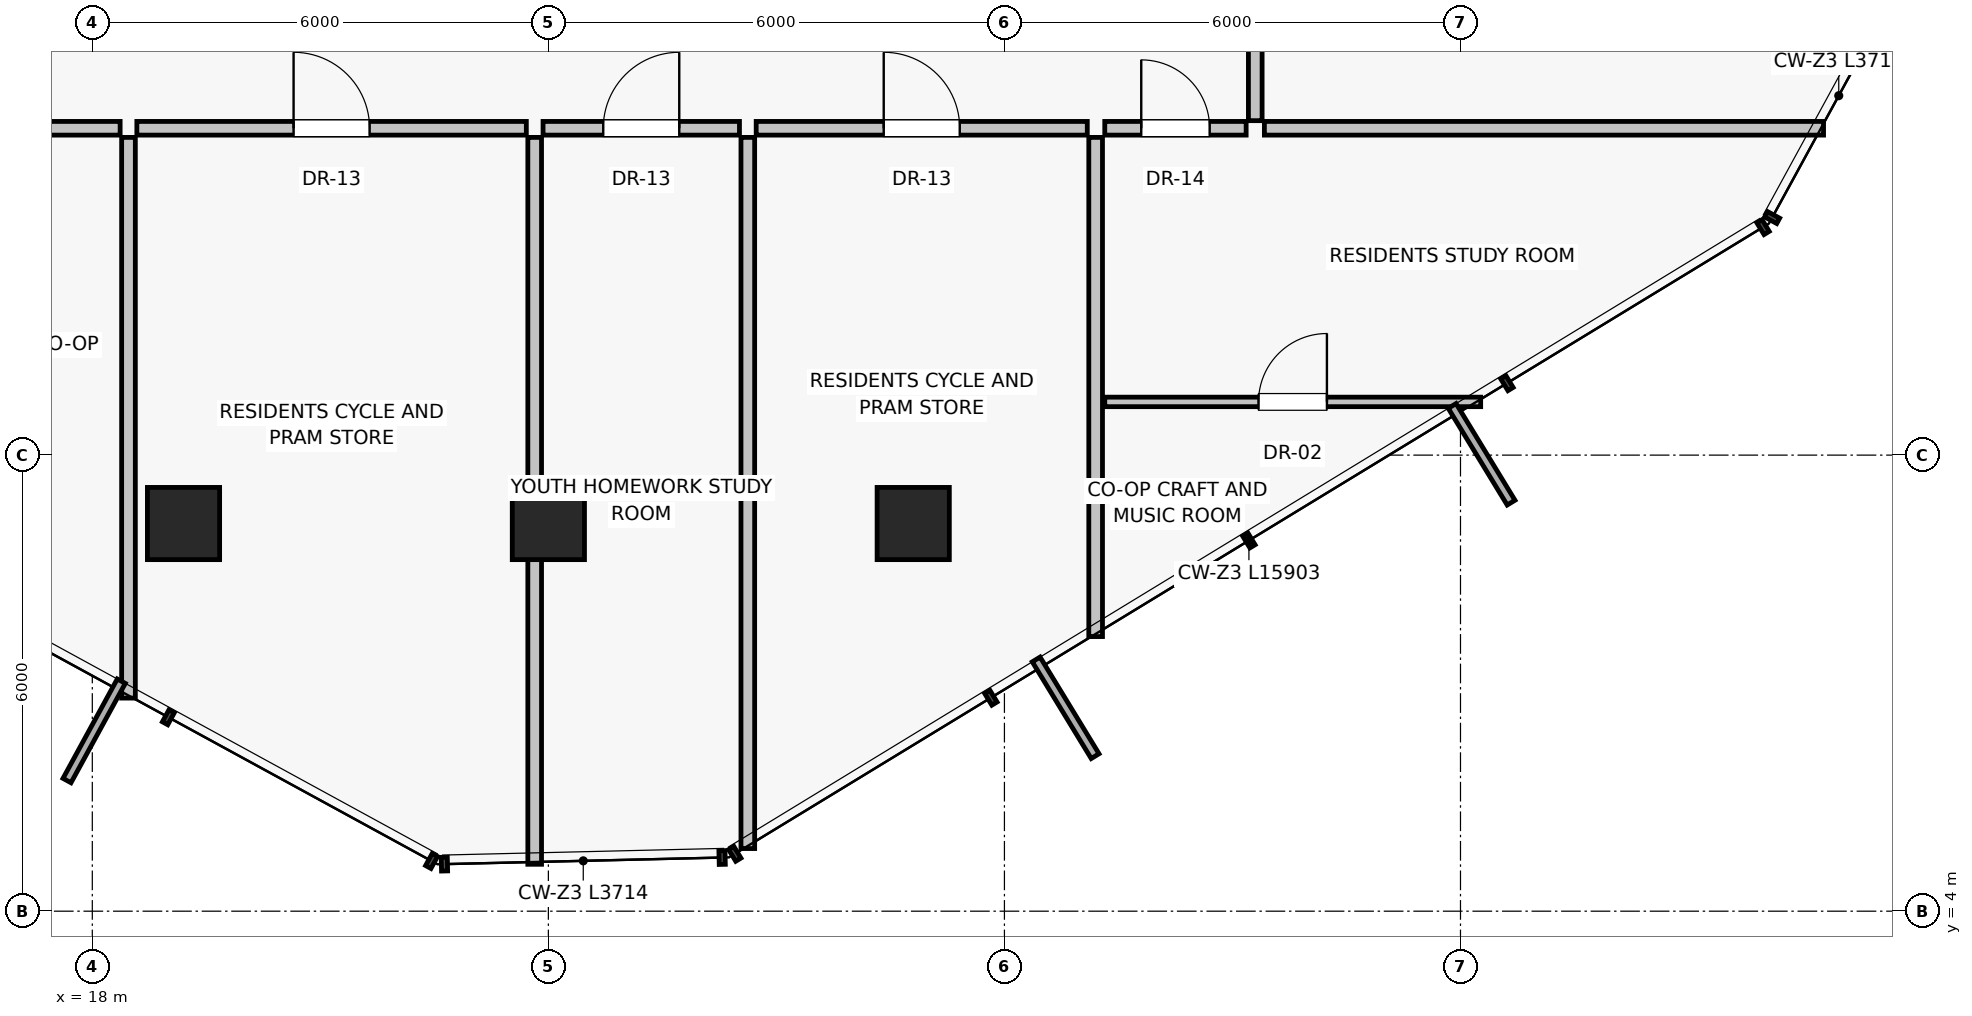
"""IFC4 building model, lengths in metres.
Left out: names, types, materials, properties, quantities, classifications, styles, units other than length and angle.
Written with IfcOpenShell. Run it as: python <this file> out.ifc"""

import sys

from ifc_helpers import new_model, si_unit, direction, frame, frame_2d, origin, origin_2d, place, context, subcontext, project, spatial, rectangle, extrude, source, transform, mapped, element, fill, save


model = new_model("IFC4")
c1 = context("Model", 3, precision=1e-05, world=origin(), true_north=direction((0.0, 1.0)))
c2 = subcontext(c1, "Body", "Model", "MODEL_VIEW")
j1 = project(units=[si_unit("LENGTHUNIT", "METRE"), si_unit("PLANEANGLEUNIT", "RADIAN")], contexts=[c1])
p1 = place(None, origin())
s1 = spatial("IfcSite", under=j1, at=p1, CompositionType="ELEMENT")
p2 = place(p1, origin())
s2 = spatial("IfcBuilding", under=s1, at=p2, CompositionType="ELEMENT")
p3 = place(p2, frame((0.0, 0.0, 201.6)))
s3 = spatial("IfcBuildingStorey", under=s2, at=p3, CompositionType="ELEMENT", Elevation=201.6)
for number, where, z_axis, x_axis in (
    (1, (19.2, 9.1, 0.0), (0.0, 0.0, 1.0), (1.0, 0.0, 0.0)),
    (2, (24.0, 9.1, 0.0), (0.0, 0.0, 1.0), (1.0, 0.0, 0.0)),
    (3, (28.8, 9.1, 0.0), (0.0, 0.0, 1.0), (1.0, 0.0, 0.0)),
):
    element("IfcColumn", number, at=place(p3, frame(where, z_axis=z_axis, x_axis=x_axis)), inside=s3, PredefinedType="COLUMN", context=c2, shape_type="SweptSolid", body=[
        extrude(rectangle(XDim=0.95, YDim=0.95, at=origin_2d()), origin(), (0.0, 0.0, 1.0), 3.25),
    ])
p4 = place(p3, frame((31.2, 14.18, 0.0), z_axis=(0.0, 0.0, 1.0), x_axis=(0.0, -1.0, 0.0)))
e4 = element("IfcWall", 4, at=p4, inside=s3, PredefinedType="PARTITIONING", context=c2, shape_type="SweptSolid", body=[
    extrude(rectangle(XDim=6.567, YDim=0.18, at=frame_2d((3.284, 0.0))), origin(), (0.0, 0.0, 1.0), 3.015),
])
p5 = place(p3, frame((15.31, 14.3, 0.0), z_axis=(0.0, 0.0, 1.0), x_axis=(1.0, 0.0, 0.0)))
e5 = element("IfcWall", 5, at=p5, inside=s3, PredefinedType="PARTITIONING", context=c2, shape_type="SweptSolid", body=[
    extrude(rectangle(XDim=3.056, YDim=0.18, at=frame_2d((1.528, 0.0))), origin(), (0.0, 0.0, 1.0), 3.015),
])
p6 = place(p5, frame((1.028, 0.0, 0.0)))
e6 = element("IfcOpeningElement", 6, at=p6, cuts=e5, PredefinedType="OPENING", context=c2, shape_type="SweptSolid", body=[
    extrude(rectangle(XDim=1.0, YDim=2.01, at=frame_2d((0.5, 1.005))), frame((0.0, 0.1, 0.0), z_axis=(0.0, -1.0, 0.0), x_axis=(1.0, 0.0, 0.0)), (0.0, 0.0, 1.0), 0.2),
])
p7 = place(p3, frame((18.586, 14.3, 0.0), z_axis=(0.0, 0.0, 1.0), x_axis=(1.0, 0.0, 0.0)))
e7 = element("IfcWall", 7, at=p7, inside=s3, PredefinedType="PARTITIONING", context=c2, shape_type="SweptSolid", body=[
    extrude(rectangle(XDim=5.124, YDim=0.18, at=frame_2d((2.562, 0.0))), origin(), (0.0, 0.0, 1.0), 3.015),
])
p8 = place(p7, frame((2.062, 0.0, 0.0)))
e8 = element("IfcOpeningElement", 8, at=p8, cuts=e7, PredefinedType="OPENING", context=c2, shape_type="SweptSolid", body=[
    extrude(rectangle(XDim=1.0, YDim=2.01, at=frame_2d((0.5, 1.005))), frame((0.0, 0.1, 0.0), z_axis=(0.0, -1.0, 0.0), x_axis=(1.0, 0.0, 0.0)), (0.0, 0.0, 1.0), 0.2),
])
p9 = place(p3, frame((18.476, 14.18, 0.0), z_axis=(0.0, 0.0, 1.0), x_axis=(0.0, -1.0, 0.0)))
e9 = element("IfcWall", 9, at=p9, inside=s3, PredefinedType="PARTITIONING", context=c2, shape_type="SweptSolid", body=[
    extrude(rectangle(XDim=7.376, YDim=0.18, at=frame_2d((3.688, 0.0))), origin(), (0.0, 0.0, 1.0), 3.015),
])
p10 = place(p3, frame((23.82, 14.18, 0.0), z_axis=(0.0, 0.0, 1.0), x_axis=(0.0, -1.0, 0.0)))
e10 = element("IfcWall", 10, at=p10, inside=s3, PredefinedType="PARTITIONING", context=c2, shape_type="SweptSolid", body=[
    extrude(rectangle(XDim=9.563, YDim=0.18, at=frame_2d((4.781, 0.0))), origin(), (0.0, 0.0, 1.0), 3.015),
])
p11 = place(p3, frame((23.93, 14.3, 0.0), z_axis=(0.0, 0.0, 1.0), x_axis=(1.0, 0.0, 0.0)))
e11 = element("IfcWall", 11, at=p11, inside=s3, PredefinedType="PARTITIONING", context=c2, shape_type="SweptSolid", body=[
    extrude(rectangle(XDim=2.584, YDim=0.18, at=frame_2d((1.292, 0.0))), origin(), (0.0, 0.0, 1.0), 3.015),
])
p12 = place(p11, frame((0.792, 0.0, 0.0)))
e12 = element("IfcOpeningElement", 12, at=p12, cuts=e11, PredefinedType="OPENING", context=c2, shape_type="SweptSolid", body=[
    extrude(rectangle(XDim=1.0, YDim=2.01, at=frame_2d((0.5, 1.005))), frame((0.0, 0.1, 0.0), z_axis=(0.0, -1.0, 0.0), x_axis=(1.0, 0.0, 0.0)), (0.0, 0.0, 1.0), 0.2),
])
p13 = place(p3, frame((26.734, 14.3, 0.0), z_axis=(0.0, 0.0, 1.0), x_axis=(1.0, 0.0, 0.0)))
e13 = element("IfcWall", 13, at=p13, inside=s3, PredefinedType="PARTITIONING", context=c2, shape_type="SweptSolid", body=[
    extrude(rectangle(XDim=4.356, YDim=0.18, at=frame_2d((2.178, 0.0))), origin(), (0.0, 0.0, 1.0), 3.015),
])
p14 = place(p13, frame((1.678, 0.0, 0.0)))
e14 = element("IfcOpeningElement", 14, at=p14, cuts=e13, PredefinedType="OPENING", context=c2, shape_type="SweptSolid", body=[
    extrude(rectangle(XDim=1.0, YDim=2.01, at=frame_2d((0.5, 1.005))), frame((0.0, 0.1, 0.0), z_axis=(0.0, -1.0, 0.0), x_axis=(1.0, 0.0, 0.0)), (0.0, 0.0, 1.0), 0.2),
])
p15 = place(p3, frame((26.624, 14.18, 0.0), z_axis=(0.0, 0.0, 1.0), x_axis=(0.0, -1.0, 0.0)))
e15 = element("IfcWall", 15, at=p15, inside=s3, PredefinedType="PARTITIONING", context=c2, shape_type="SweptSolid", body=[
    extrude(rectangle(XDim=9.356, YDim=0.18, at=frame_2d((4.678, 0.0))), origin(), (0.0, 0.0, 1.0), 3.015),
])
p16 = place(p3, frame((33.3, 14.4, 0.0), z_axis=(0.0, 0.0, 1.0), x_axis=(0.0, 1.0, 0.0)))
e16 = element("IfcWall", 16, at=p16, inside=s3, PredefinedType="PARTITIONING", context=c2, shape_type="SweptSolid", body=[
    extrude(rectangle(XDim=1.9, YDim=0.18, at=frame_2d((0.95, 0.0))), origin(), (0.0, 0.0, 1.0), 3.015),
])
p17 = place(p3, frame((33.42, 14.3, 0.0), z_axis=(0.0, 0.0, 1.0), x_axis=(1.0, 0.0, 0.0)))
e17 = element("IfcWall", 17, at=p17, inside=s3, PredefinedType="PARTITIONING", context=c2, shape_type="SweptSolid", body=[
    extrude(rectangle(XDim=7.357, YDim=0.18, at=frame_2d((3.678, 0.0))), origin(), (0.0, 0.0, 1.0), 3.015),
])
p18 = place(p3, frame((31.32, 14.3, 0.0), z_axis=(0.0, 0.0, 1.0), x_axis=(1.0, 0.0, 0.0)))
e18 = element("IfcWall", 18, at=p18, inside=s3, PredefinedType="PARTITIONING", context=c2, shape_type="SweptSolid", body=[
    extrude(rectangle(XDim=1.86, YDim=0.18, at=frame_2d((0.93, 0.0))), origin(), (0.0, 0.0, 1.0), 3.015),
])
p19 = place(p18, frame((0.48, 0.0, 0.0)))
e19 = element("IfcOpeningElement", 19, at=p19, cuts=e18, PredefinedType="OPENING", context=c2, shape_type="SweptSolid", body=[
    extrude(rectangle(XDim=0.9, YDim=2.01, at=frame_2d((0.45, 1.005))), frame((0.0, 0.1, 0.0), z_axis=(0.0, -1.0, 0.0), x_axis=(1.0, 0.0, 0.0)), (0.0, 0.0, 1.0), 0.2),
])
p20 = place(p3, frame((31.32, 10.7, 0.0), z_axis=(0.0, 0.0, 1.0), x_axis=(1.0, 0.0, 0.0)))
e20 = element("IfcWall", 20, at=p20, inside=s3, PredefinedType="PARTITIONING", context=c2, shape_type="SweptSolid", body=[
    extrude(rectangle(XDim=4.946, YDim=0.125, at=frame_2d((2.473, 0.0))), origin(), (0.0, 0.0, 1.0), 3.015),
])
p21 = place(p20, frame((2.023, 0.0, 0.0)))
e21 = element("IfcOpeningElement", 21, at=p21, cuts=e20, PredefinedType="OPENING", context=c2, shape_type="SweptSolid", body=[
    extrude(rectangle(XDim=0.9, YDim=2.01, at=frame_2d((0.45, 1.005))), frame((0.0, 0.073, 0.0), z_axis=(0.0, -1.0, 0.0), x_axis=(1.0, 0.0, 0.0)), (0.0, 0.0, 1.0), 0.145),
])
m1 = source(origin(), c2, "Body", "SweptSolid", [
    extrude(rectangle(XDim=1.0, YDim=2.01, at=frame_2d((0.5, 1.005))), frame((0.0, 0.025, 0.0), z_axis=(0.0, -1.0, 0.0), x_axis=(1.0, 0.0, 0.0)), (0.0, 0.0, 1.0), 0.05),
])
p22 = place(p8, origin())
e22 = element("IfcDoor", 22, at=p22, inside=s3, OperationType="SINGLE_SWING_LEFT", PredefinedType="DOOR", context=c2, shape_type="MappedRepresentation", body=[
    mapped(m1, transform((0.0, 0.0, 0.0), scale=1.0)),
])
fill(e8, e22)
p23 = place(p12, origin())
e23 = element("IfcDoor", 23, at=p23, inside=s3, OperationType="SINGLE_SWING_RIGHT", PredefinedType="DOOR", context=c2, shape_type="MappedRepresentation", body=[
    mapped(m1, transform((0.0, 0.0, 0.0), scale=1.0)),
])
fill(e12, e23)
p24 = place(p14, origin())
e24 = element("IfcDoor", 24, at=p24, inside=s3, OperationType="SINGLE_SWING_LEFT", PredefinedType="DOOR", context=c2, shape_type="MappedRepresentation", body=[
    mapped(m1, transform((0.0, 0.0, 0.0), scale=1.0)),
])
fill(e14, e24)
m2 = source(origin(), c2, "Body", "SweptSolid", [
    extrude(rectangle(XDim=0.9, YDim=2.01, at=frame_2d((0.45, 1.005))), frame((0.0, 0.025, 0.0), z_axis=(0.0, -1.0, 0.0), x_axis=(1.0, 0.0, 0.0)), (0.0, 0.0, 1.0), 0.05),
])
p25 = place(p19, origin())
e25 = element("IfcDoor", 25, at=p25, inside=s3, OperationType="SINGLE_SWING_LEFT", PredefinedType="DOOR", context=c2, shape_type="MappedRepresentation", body=[
    mapped(m2, transform((0.0, 0.0, 0.0), scale=1.0)),
])
fill(e19, e25)
p26 = place(p21, origin())
e26 = element("IfcDoor", 26, at=p26, inside=s3, OperationType="SINGLE_SWING_RIGHT", PredefinedType="DOOR", context=c2, shape_type="MappedRepresentation", body=[
    mapped(m2, transform((0.0, 0.0, 0.0), scale=1.0)),
])
fill(e21, e26)
save(model, sys.argv[1])
